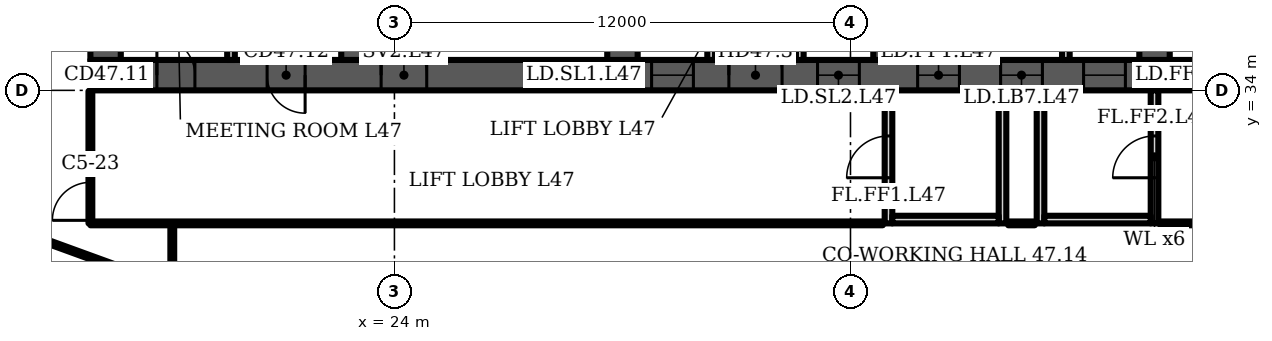
"""IFC4 building model, lengths in metres.
Left out: names, types, materials, properties, quantities, classifications, styles, units other than length and angle.
Written with IfcOpenShell. Run it as: python <this file> out.ifc"""

import sys

from ifc_helpers import new_model, si_unit, direction, frame, frame_2d, origin, place, context, subcontext, project, spatial, polyline, rectangle, outline, extrude, element, fill, save


model = new_model("IFC4")
c1 = context("Model", 3, precision=1e-05, world=origin(), true_north=direction((0.0, 1.0)))
c2 = subcontext(c1, "Body", "Model", "MODEL_VIEW")
j1 = project(units=[si_unit("LENGTHUNIT", "METRE"), si_unit("PLANEANGLEUNIT", "RADIAN")], contexts=[c1])
p1 = place(None, origin())
s1 = spatial("IfcSite", under=j1, at=p1, CompositionType="ELEMENT")
p2 = place(p1, origin())
s2 = spatial("IfcBuilding", under=s1, at=p2, CompositionType="ELEMENT")
p3 = place(p2, frame((0.0, 0.0, 191.5)))
s3 = spatial("IfcBuildingStorey", under=s2, at=p3, CompositionType="ELEMENT", Elevation=191.5)
p4 = place(p3, frame((16.0, 34.4, 0.0), z_axis=(0.0, 0.0, 1.0), x_axis=(1.0, 0.0, 0.0)))
e1 = element("IfcWall", 1, at=p4, inside=s3, PredefinedType="SHEAR", context=c2, shape_type="SweptSolid", body=[
    extrude(rectangle(XDim=42.0, YDim=0.8, at=frame_2d((21.0, 0.0))), origin(), (0.0, 0.0, 1.0), 3.6),
])
p5 = place(p4, frame((1.75, 0.0, 0.0)))
e2 = element("IfcOpeningElement", 2, at=p5, cuts=e1, PredefinedType="OPENING", context=c2, shape_type="SweptSolid", body=[
    extrude(rectangle(XDim=1.0, YDim=2.1, at=frame_2d((0.5, 1.05))), frame((0.0, 0.41, 0.0), z_axis=(0.0, -1.0, 0.0), x_axis=(1.0, 0.0, 0.0)), (0.0, 0.0, 1.0), 0.82),
])
p6 = place(p4, frame((4.65, 0.0, 0.0)))
e3 = element("IfcOpeningElement", 3, at=p6, cuts=e1, PredefinedType="OPENING", context=c2, shape_type="SweptSolid", body=[
    extrude(rectangle(XDim=1.0, YDim=2.1, at=frame_2d((0.5, 1.05))), frame((0.0, 0.41, 0.0), z_axis=(0.0, -1.0, 0.0), x_axis=(1.0, 0.0, 0.0)), (0.0, 0.0, 1.0), 0.82),
])
p7 = place(p4, frame((7.65, 0.0, 0.0)))
e4 = element("IfcOpeningElement", 4, at=p7, cuts=e1, PredefinedType="OPENING", context=c2, shape_type="SweptSolid", body=[
    extrude(rectangle(XDim=1.2, YDim=2.1, at=frame_2d((0.6, 1.05))), frame((0.0, 0.41, 0.0), z_axis=(0.0, -1.0, 0.0), x_axis=(1.0, 0.0, 0.0)), (0.0, 0.0, 1.0), 0.82),
])
p8 = place(p4, frame((14.767, 0.0, 0.0)))
e5 = element("IfcOpeningElement", 5, at=p8, cuts=e1, PredefinedType="OPENING", context=c2, shape_type="SweptSolid", body=[
    extrude(rectangle(XDim=1.1, YDim=2.1, at=frame_2d((0.55, 1.05))), frame((0.0, 0.41, 0.0), z_axis=(0.0, -1.0, 0.0), x_axis=(1.0, 0.0, 0.0)), (0.0, 0.0, 1.0), 0.82),
])
p9 = place(p4, frame((19.133, 0.0, 0.0)))
e6 = element("IfcOpeningElement", 6, at=p9, cuts=e1, PredefinedType="OPENING", context=c2, shape_type="SweptSolid", body=[
    extrude(rectangle(XDim=1.1, YDim=2.1, at=frame_2d((0.55, 1.05))), frame((0.0, 0.41, 0.0), z_axis=(0.0, -1.0, 0.0), x_axis=(1.0, 0.0, 0.0)), (0.0, 0.0, 1.0), 0.82),
])
p10 = place(p4, frame((16.8, 0.0, 0.0)))
e7 = element("IfcOpeningElement", 7, at=p10, cuts=e1, PredefinedType="OPENING", context=c2, shape_type="SweptSolid", body=[
    extrude(rectangle(XDim=1.4, YDim=2.1, at=frame_2d((0.7, 1.05))), frame((0.0, 0.41, 0.0), z_axis=(0.0, -1.0, 0.0), x_axis=(1.0, 0.0, 0.0)), (0.0, 0.0, 1.0), 0.82),
])
p11 = place(p4, frame((21.767, 0.0, 0.0)))
e8 = element("IfcOpeningElement", 8, at=p11, cuts=e1, PredefinedType="OPENING", context=c2, shape_type="SweptSolid", body=[
    extrude(rectangle(XDim=1.1, YDim=2.1, at=frame_2d((0.55, 1.05))), frame((0.0, 0.41, 0.0), z_axis=(0.0, -1.0, 0.0), x_axis=(1.0, 0.0, 0.0)), (0.0, 0.0, 1.0), 0.82),
])
p12 = place(p4, frame((23.95, 0.0, 0.0)))
e9 = element("IfcOpeningElement", 9, at=p12, cuts=e1, PredefinedType="OPENING", context=c2, shape_type="SweptSolid", body=[
    extrude(rectangle(XDim=1.1, YDim=2.1, at=frame_2d((0.55, 1.05))), frame((0.0, 0.41, 0.0), z_axis=(0.0, -1.0, 0.0), x_axis=(1.0, 0.0, 0.0)), (0.0, 0.0, 1.0), 0.82),
])
p13 = place(p4, frame((26.133, 0.0, 0.0)))
e10 = element("IfcOpeningElement", 10, at=p13, cuts=e1, PredefinedType="OPENING", context=c2, shape_type="SweptSolid", body=[
    extrude(rectangle(XDim=1.1, YDim=2.1, at=frame_2d((0.55, 1.05))), frame((0.0, 0.41, 0.0), z_axis=(0.0, -1.0, 0.0), x_axis=(1.0, 0.0, 0.0)), (0.0, 0.0, 1.0), 0.82),
])
p14 = place(p4, frame((33.15, 0.0, 0.0)))
e11 = element("IfcOpeningElement", 11, at=p14, cuts=e1, PredefinedType="OPENING", context=c2, shape_type="SweptSolid", body=[
    extrude(rectangle(XDim=1.2, YDim=2.1, at=frame_2d((0.6, 1.05))), frame((0.0, 0.41, 0.0), z_axis=(0.0, -1.0, 0.0), x_axis=(1.0, 0.0, 0.0)), (0.0, 0.0, 1.0), 0.82),
])
p15 = place(p4, frame((37.767, 0.0, 0.0)))
e12 = element("IfcOpeningElement", 12, at=p15, cuts=e1, PredefinedType="OPENING", context=c2, shape_type="SweptSolid", body=[
    extrude(rectangle(XDim=1.4, YDim=2.1, at=frame_2d((0.7, 1.05))), frame((0.0, 0.41, 0.0), z_axis=(0.0, -1.0, 0.0), x_axis=(1.0, 0.0, 0.0)), (0.0, 0.0, 1.0), 0.82),
])
p16 = place(p3, frame((16.4, 34.8, 0.0), z_axis=(0.0, 0.0, 1.0), x_axis=(0.0, 1.0, 0.0)))
e13 = element("IfcWall", 13, at=p16, inside=s3, PredefinedType="SHEAR", context=c2, shape_type="SweptSolid", body=[
    extrude(rectangle(XDim=13.184, YDim=0.8, at=frame_2d((6.592, 0.0))), origin(), (0.0, 0.0, 1.0), 3.6),
])
p17 = place(p3, frame((23.0, 34.8, 0.0), z_axis=(0.0, 0.0, 1.0), x_axis=(0.0, 1.0, 0.0)))
e14 = element("IfcWall", 14, at=p17, inside=s3, PredefinedType="SHEAR", context=c2, shape_type="SweptSolid", body=[
    extrude(rectangle(XDim=13.762, YDim=0.8, at=frame_2d((6.881, 0.0))), origin(), (0.0, 0.0, 1.0), 3.6),
])
p18 = place(p17, frame((10.0, 0.0, 0.0)))
e15 = element("IfcOpeningElement", 15, at=p18, cuts=e14, PredefinedType="OPENING", context=c2, shape_type="SweptSolid", body=[
    extrude(rectangle(XDim=1.0, YDim=2.1, at=frame_2d((0.5, 1.05))), frame((0.0, 0.41, 0.0), z_axis=(0.0, -1.0, 0.0), x_axis=(1.0, 0.0, 0.0)), (0.0, 0.0, 1.0), 0.82),
])
p19 = place(p3, frame((30.0, 34.8, 0.0), z_axis=(0.0, 0.0, 1.0), x_axis=(0.0, 1.0, 0.0)))
e16 = element("IfcWall", 16, at=p19, inside=s3, PredefinedType="SHEAR", context=c2, shape_type="SweptSolid", body=[
    extrude(rectangle(XDim=14.374, YDim=0.8, at=frame_2d((7.187, 0.0))), origin(), (0.0, 0.0, 1.0), 3.6),
])
p20 = place(p19, frame((3.6, 0.0, 0.0)))
e17 = element("IfcOpeningElement", 17, at=p20, cuts=e16, PredefinedType="OPENING", context=c2, shape_type="SweptSolid", body=[
    extrude(rectangle(XDim=1.1, YDim=2.1, at=frame_2d((0.55, 1.05))), frame((0.0, 0.41, 0.0), z_axis=(0.0, -1.0, 0.0), x_axis=(1.0, 0.0, 0.0)), (0.0, 0.0, 1.0), 0.82),
])
p21 = place(p3, frame((37.0, 34.8, 0.0), z_axis=(0.0, 0.0, 1.0), x_axis=(0.0, 1.0, 0.0)))
e18 = element("IfcWall", 18, at=p21, inside=s3, PredefinedType="SHEAR", context=c2, shape_type="SweptSolid", body=[
    extrude(rectangle(XDim=14.987, YDim=0.8, at=frame_2d((7.493, 0.0))), origin(), (0.0, 0.0, 1.0), 3.6),
])
p22 = place(p21, frame((11.312, 0.0, 0.0)))
e19 = element("IfcOpeningElement", 19, at=p22, cuts=e18, PredefinedType="OPENING", context=c2, shape_type="SweptSolid", body=[
    extrude(rectangle(XDim=1.0, YDim=2.1, at=frame_2d((0.5, 1.05))), frame((0.0, 0.41, 0.0), z_axis=(0.0, -1.0, 0.0), x_axis=(1.0, 0.0, 0.0)), (0.0, 0.0, 1.0), 0.82),
])
p23 = place(p21, frame((3.6, 0.0, 0.0)))
e20 = element("IfcOpeningElement", 20, at=p23, cuts=e18, PredefinedType="OPENING", context=c2, shape_type="SweptSolid", body=[
    extrude(rectangle(XDim=1.1, YDim=2.1, at=frame_2d((0.55, 1.05))), frame((0.0, 0.41, 0.0), z_axis=(0.0, -1.0, 0.0), x_axis=(1.0, 0.0, 0.0)), (0.0, 0.0, 1.0), 0.82),
])
p24 = place(p3, frame((44.0, 34.8, 0.0), z_axis=(0.0, 0.0, 1.0), x_axis=(0.0, 1.0, 0.0)))
e21 = element("IfcWall", 21, at=p24, inside=s3, PredefinedType="SHEAR", context=c2, shape_type="SweptSolid", body=[
    extrude(rectangle(XDim=14.374, YDim=0.8, at=frame_2d((7.187, 0.0))), origin(), (0.0, 0.0, 1.0), 3.6),
])
p25 = place(p24, frame((11.312, 0.0, 0.0)))
e22 = element("IfcOpeningElement", 22, at=p25, cuts=e21, PredefinedType="OPENING", context=c2, shape_type="SweptSolid", body=[
    extrude(rectangle(XDim=1.0, YDim=2.1, at=frame_2d((0.5, 1.05))), frame((0.0, 0.41, 0.0), z_axis=(0.0, -1.0, 0.0), x_axis=(1.0, 0.0, 0.0)), (0.0, 0.0, 1.0), 0.82),
])
p26 = place(p24, frame((3.6, 0.0, 0.0)))
e23 = element("IfcOpeningElement", 23, at=p26, cuts=e21, PredefinedType="OPENING", context=c2, shape_type="SweptSolid", body=[
    extrude(rectangle(XDim=1.1, YDim=2.1, at=frame_2d((0.55, 1.05))), frame((0.0, 0.41, 0.0), z_axis=(0.0, -1.0, 0.0), x_axis=(1.0, 0.0, 0.0)), (0.0, 0.0, 1.0), 0.82),
])
p27 = place(p3, frame((19.7, 34.8, 0.0), z_axis=(0.0, 0.0, 1.0), x_axis=(0.0, 1.0, 0.0)))
e24 = element("IfcWall", 24, at=p27, inside=s3, PredefinedType="PARTITIONING", context=c2, shape_type="SweptSolid", body=[
    extrude(rectangle(XDim=13.234, YDim=0.2, at=frame_2d((6.617, 0.0))), origin(), (0.0, 0.0, 1.0), 3.2),
])
p28 = place(p3, frame((0.0, 0.0, -0.0)))
e25 = element("IfcWall", 25, at=p28, inside=s3, PredefinedType="PARTITIONING", context=c2, shape_type="SweptSolid", body=[
    extrude(outline(polyline([(32.233, 37.65), (30.4, 37.65), (30.4, 37.85), (32.233, 37.85), (32.433, 37.85), (32.433, 34.8), (32.233, 34.8), (32.233, 37.65)])), origin(), (0.0, 0.0, 1.0), 3.2),
])
p29 = place(p3, frame((0.0, 0.0, -0.0)))
e26 = element("IfcWall", 26, at=p29, inside=s3, PredefinedType="PARTITIONING", context=c2, shape_type="SweptSolid", body=[
    extrude(outline(polyline([(34.567, 37.85), (34.767, 37.85), (36.6, 37.85), (36.6, 37.65), (34.767, 37.65), (34.767, 34.8), (34.567, 34.8), (34.567, 37.85)])), origin(), (0.0, 0.0, 1.0), 3.2),
])
p30 = place(p3, frame((0.0, 0.0, -0.0)))
e27 = element("IfcWall", 27, at=p30, inside=s3, PredefinedType="PARTITIONING", context=c2, shape_type="SweptSolid", body=[
    extrude(outline(polyline([(41.567, 37.1), (39.433, 37.1), (39.433, 34.8), (39.233, 34.8), (39.233, 37.65), (37.4, 37.65), (37.4, 37.85), (39.233, 37.85), (39.433, 37.85), (39.433, 37.3), (41.567, 37.3), (41.567, 37.55), (41.767, 37.55), (43.6, 37.55), (43.6, 37.35), (41.767, 37.35), (41.767, 34.8), (41.567, 34.8), (41.567, 37.1)])), origin(), (0.0, 0.0, 1.0), 3.2),
])
p31 = place(p3, frame((37.0, 30.5, 0.0), z_axis=(0.0, 0.0, 1.0), x_axis=(0.0, 1.0, 0.0)))
e28 = element("IfcWall", 28, at=p31, inside=s3, PredefinedType="PARTITIONING", context=c2, shape_type="SweptSolid", body=[
    extrude(rectangle(XDim=3.5, YDim=0.2, at=frame_2d((1.75, 0.0))), origin(), (0.0, 0.0, 1.0), 3.2),
])
p32 = place(p31, frame((1.2, 0.0, 0.0)))
e29 = element("IfcOpeningElement", 29, at=p32, cuts=e28, PredefinedType="OPENING", context=c2, shape_type="SweptSolid", body=[
    extrude(rectangle(XDim=1.1, YDim=2.1, at=frame_2d((0.55, 1.05))), frame((0.0, 0.11, 0.0), z_axis=(0.0, -1.0, 0.0), x_axis=(1.0, 0.0, 0.0)), (0.0, 0.0, 1.0), 0.22),
])
p33 = place(p3, frame((40.0, 30.5, 0.0), z_axis=(0.0, 0.0, 1.0), x_axis=(0.0, 1.0, 0.0)))
e30 = element("IfcWall", 30, at=p33, inside=s3, PredefinedType="PARTITIONING", context=c2, shape_type="SweptSolid", body=[
    extrude(rectangle(XDim=3.5, YDim=0.2, at=frame_2d((1.75, 0.0))), origin(), (0.0, 0.0, 1.0), 3.2),
])
p34 = place(p3, frame((37.1, 30.6, 0.0), z_axis=(0.0, 0.0, 1.0), x_axis=(1.0, 0.0, 0.0)))
e31 = element("IfcWall", 31, at=p34, inside=s3, PredefinedType="PARTITIONING", context=c2, shape_type="SweptSolid", body=[
    extrude(rectangle(XDim=2.8, YDim=0.2, at=frame_2d((1.4, 0.0))), origin(), (0.0, 0.0, 1.0), 3.2),
])
p35 = place(p3, frame((41.0, 30.5, 0.0), z_axis=(0.0, 0.0, 1.0), x_axis=(0.0, 1.0, 0.0)))
e32 = element("IfcWall", 32, at=p35, inside=s3, PredefinedType="PARTITIONING", context=c2, shape_type="SweptSolid", body=[
    extrude(rectangle(XDim=3.5, YDim=0.2, at=frame_2d((1.75, 0.0))), origin(), (0.0, 0.0, 1.0), 3.2),
])
p36 = place(p3, frame((44.0, 30.5, 0.0), z_axis=(0.0, 0.0, 1.0), x_axis=(0.0, 1.0, 0.0)))
e33 = element("IfcWall", 33, at=p36, inside=s3, PredefinedType="PARTITIONING", context=c2, shape_type="SweptSolid", body=[
    extrude(rectangle(XDim=3.5, YDim=0.2, at=frame_2d((1.75, 0.0))), origin(), (0.0, 0.0, 1.0), 3.2),
])
p37 = place(p36, frame((1.2, 0.0, 0.0)))
e34 = element("IfcOpeningElement", 34, at=p37, cuts=e33, PredefinedType="OPENING", context=c2, shape_type="SweptSolid", body=[
    extrude(rectangle(XDim=1.1, YDim=2.1, at=frame_2d((0.55, 1.05))), frame((0.0, 0.11, 0.0), z_axis=(0.0, -1.0, 0.0), x_axis=(1.0, 0.0, 0.0)), (0.0, 0.0, 1.0), 0.22),
])
p38 = place(p3, frame((41.1, 30.6, 0.0), z_axis=(0.0, 0.0, 1.0), x_axis=(1.0, 0.0, 0.0)))
e35 = element("IfcWall", 35, at=p38, inside=s3, PredefinedType="PARTITIONING", context=c2, shape_type="SweptSolid", body=[
    extrude(rectangle(XDim=2.8, YDim=0.2, at=frame_2d((1.4, 0.0))), origin(), (0.0, 0.0, 1.0), 3.2),
])
p39 = place(p3, frame((16.0, 30.5, 0.0), z_axis=(0.0, 0.0, 1.0), x_axis=(0.0, 1.0, 0.0)))
e36 = element("IfcWall", 36, at=p39, inside=s3, PredefinedType="PARTITIONING", context=c2, shape_type="SweptSolid", body=[
    extrude(rectangle(XDim=3.48, YDim=0.1, at=frame_2d((1.74, 0.0))), origin(), (0.0, 0.0, 1.0), 3.2),
])
p40 = place(p39, frame((0.08, 0.0, 0.0)))
e37 = element("IfcOpeningElement", 37, at=p40, cuts=e36, PredefinedType="OPENING", context=c2, shape_type="SweptSolid", body=[
    extrude(rectangle(XDim=1.0, YDim=2.1, at=frame_2d((0.5, 1.05))), frame((0.0, 0.06, 0.0), z_axis=(0.0, -1.0, 0.0), x_axis=(1.0, 0.0, 0.0)), (0.0, 0.0, 1.0), 0.12),
])
p41 = place(p3, frame((16.0, 30.5, 0.0), z_axis=(0.0, 0.0, 1.0), x_axis=(1.0, 0.0, 0.0)))
e38 = element("IfcWall", 38, at=p41, inside=s3, PredefinedType="PARTITIONING", context=c2, shape_type="SweptSolid", body=[
    extrude(rectangle(XDim=20.85, YDim=0.1, at=frame_2d((10.425, 0.0))), origin(), (0.0, 0.0, 1.0), 3.2),
])
p42 = place(p3, frame((17.185, 29.175, 0.0), z_axis=(0.0, 0.0, 1.0), x_axis=(-0.939764, 0.341818, 0.0)))
e39 = element("IfcWall", 39, at=p42, inside=s3, PredefinedType="PARTITIONING", context=c2, shape_type="SweptSolid", body=[
    extrude(rectangle(XDim=2.852, YDim=0.1, at=frame_2d((1.426, 0.0))), origin(), (0.0, 0.0, 1.0), 3.2),
])
p43 = place(p3, frame((18.155, 29.18, 0.0), z_axis=(0.0, 0.0, 1.0), x_axis=(0.0, 1.0, 0.0)))
e40 = element("IfcWall", 40, at=p43, inside=s3, PredefinedType="PARTITIONING", context=c2, shape_type="SweptSolid", body=[
    extrude(rectangle(XDim=1.32, YDim=0.1, at=frame_2d((0.66, 0.0))), origin(), (0.0, 0.0, 1.0), 3.2),
])
p44 = place(p3, frame((40.15, 30.5, 0.0), z_axis=(0.0, 0.0, 1.0), x_axis=(1.0, 0.0, 0.0)))
e41 = element("IfcWall", 41, at=p44, inside=s3, PredefinedType="PARTITIONING", context=c2, shape_type="SweptSolid", body=[
    extrude(rectangle(XDim=0.7, YDim=0.1, at=frame_2d((0.35, 0.0))), origin(), (0.0, 0.0, 1.0), 3.2),
])
p45 = place(p3, frame((44.15, 30.5, 0.0), z_axis=(0.0, 0.0, 1.0), x_axis=(1.0, 0.0, 0.0)))
e42 = element("IfcWall", 42, at=p45, inside=s3, PredefinedType="PARTITIONING", context=c2, shape_type="SweptSolid", body=[
    extrude(rectangle(XDim=13.85, YDim=0.1, at=frame_2d((6.925, 0.0))), origin(), (0.0, 0.0, 1.0), 3.2),
])
p46 = place(p5, origin())
e43 = element("IfcDoor", 43, at=p46, inside=s3, OperationType="SINGLE_SWING_LEFT", PredefinedType="DOOR", context=c2, shape_type="SweptSolid", body=[
    extrude(rectangle(XDim=1.0, YDim=2.1, at=frame_2d((0.5, 1.05))), frame((0.0, 0.4, 0.0), z_axis=(0.0, -1.0, 0.0), x_axis=(1.0, 0.0, 0.0)), (0.0, 0.0, 1.0), 0.8),
])
fill(e2, e43)
p47 = place(p6, origin())
e44 = element("IfcDoor", 44, at=p47, inside=s3, OperationType="SINGLE_SWING_RIGHT", PredefinedType="DOOR", context=c2, shape_type="SweptSolid", body=[
    extrude(rectangle(XDim=1.0, YDim=2.1, at=frame_2d((0.5, 1.05))), frame((0.0, 0.4, 0.0), z_axis=(0.0, -1.0, 0.0), x_axis=(1.0, 0.0, 0.0)), (0.0, 0.0, 1.0), 0.8),
])
fill(e3, e44)
p48 = place(p7, origin())
e45 = element("IfcDoor", 45, at=p48, inside=s3, OperationType="SINGLE_SWING_LEFT", PredefinedType="DOOR", context=c2, shape_type="SweptSolid", body=[
    extrude(rectangle(XDim=1.2, YDim=2.1, at=frame_2d((0.6, 1.05))), frame((0.0, 0.025, 0.0), z_axis=(0.0, -1.0, 0.0), x_axis=(1.0, 0.0, 0.0)), (0.0, 0.0, 1.0), 0.05),
])
fill(e4, e45)
p49 = place(p8, origin())
e46 = element("IfcDoor", 46, at=p49, inside=s3, OperationType="DOUBLE_DOOR_SLIDING", PredefinedType="DOOR", context=c2, shape_type="SweptSolid", body=[
    extrude(rectangle(XDim=1.1, YDim=2.1, at=frame_2d((0.55, 1.05))), frame((0.0, 0.025, 0.0), z_axis=(0.0, -1.0, 0.0), x_axis=(1.0, 0.0, 0.0)), (0.0, 0.0, 1.0), 0.05),
])
fill(e5, e46)
p50 = place(p9, origin())
e47 = element("IfcDoor", 47, at=p50, inside=s3, OperationType="DOUBLE_DOOR_SLIDING", PredefinedType="DOOR", context=c2, shape_type="SweptSolid", body=[
    extrude(rectangle(XDim=1.1, YDim=2.1, at=frame_2d((0.55, 1.05))), frame((0.0, 0.025, 0.0), z_axis=(0.0, -1.0, 0.0), x_axis=(1.0, 0.0, 0.0)), (0.0, 0.0, 1.0), 0.05),
])
fill(e6, e47)
p51 = place(p10, origin())
e48 = element("IfcDoor", 48, at=p51, inside=s3, OperationType="DOUBLE_DOOR_SINGLE_SWING", PredefinedType="DOOR", context=c2, shape_type="SweptSolid", body=[
    extrude(rectangle(XDim=1.4, YDim=2.1, at=frame_2d((0.7, 1.05))), frame((0.0, 0.025, 0.0), z_axis=(0.0, -1.0, 0.0), x_axis=(1.0, 0.0, 0.0)), (0.0, 0.0, 1.0), 0.05),
])
fill(e7, e48)
p52 = place(p11, origin())
e49 = element("IfcDoor", 49, at=p52, inside=s3, OperationType="DOUBLE_DOOR_SLIDING", PredefinedType="DOOR", context=c2, shape_type="SweptSolid", body=[
    extrude(rectangle(XDim=1.1, YDim=2.1, at=frame_2d((0.55, 1.05))), frame((0.0, 0.025, 0.0), z_axis=(0.0, -1.0, 0.0), x_axis=(1.0, 0.0, 0.0)), (0.0, 0.0, 1.0), 0.05),
])
fill(e8, e49)
p53 = place(p12, origin())
e50 = element("IfcDoor", 50, at=p53, inside=s3, OperationType="DOUBLE_DOOR_SLIDING", PredefinedType="DOOR", context=c2, shape_type="SweptSolid", body=[
    extrude(rectangle(XDim=1.1, YDim=2.1, at=frame_2d((0.55, 1.05))), frame((0.0, 0.025, 0.0), z_axis=(0.0, -1.0, 0.0), x_axis=(1.0, 0.0, 0.0)), (0.0, 0.0, 1.0), 0.05),
])
fill(e9, e50)
p54 = place(p13, origin())
e51 = element("IfcDoor", 51, at=p54, inside=s3, OperationType="DOUBLE_DOOR_SLIDING", PredefinedType="DOOR", context=c2, shape_type="SweptSolid", body=[
    extrude(rectangle(XDim=1.1, YDim=2.1, at=frame_2d((0.55, 1.05))), frame((0.0, 0.025, 0.0), z_axis=(0.0, -1.0, 0.0), x_axis=(1.0, 0.0, 0.0)), (0.0, 0.0, 1.0), 0.05),
])
fill(e10, e51)
p55 = place(p32, origin())
e52 = element("IfcDoor", 52, at=p55, inside=s3, OperationType="SINGLE_SWING_LEFT", PredefinedType="DOOR", context=c2, shape_type="SweptSolid", body=[
    extrude(rectangle(XDim=1.1, YDim=2.1, at=frame_2d((0.55, 1.05))), frame((0.0, 0.025, 0.0), z_axis=(0.0, -1.0, 0.0), x_axis=(1.0, 0.0, 0.0)), (0.0, 0.0, 1.0), 0.05),
])
fill(e29, e52)
p56 = place(p37, origin())
e53 = element("IfcDoor", 53, at=p56, inside=s3, OperationType="SINGLE_SWING_LEFT", PredefinedType="DOOR", context=c2, shape_type="SweptSolid", body=[
    extrude(rectangle(XDim=1.1, YDim=2.1, at=frame_2d((0.55, 1.05))), frame((0.0, 0.025, 0.0), z_axis=(0.0, -1.0, 0.0), x_axis=(1.0, 0.0, 0.0)), (0.0, 0.0, 1.0), 0.05),
])
fill(e34, e53)
p57 = place(p40, origin())
e54 = element("IfcDoor", 54, at=p57, inside=s3, OperationType="SINGLE_SWING_LEFT", PredefinedType="DOOR", context=c2, shape_type="SweptSolid", body=[
    extrude(rectangle(XDim=1.0, YDim=2.1, at=frame_2d((0.5, 1.05))), frame((0.0, 0.025, 0.0), z_axis=(0.0, -1.0, 0.0), x_axis=(1.0, 0.0, 0.0)), (0.0, 0.0, 1.0), 0.05),
])
fill(e37, e54)
save(model, sys.argv[1])
